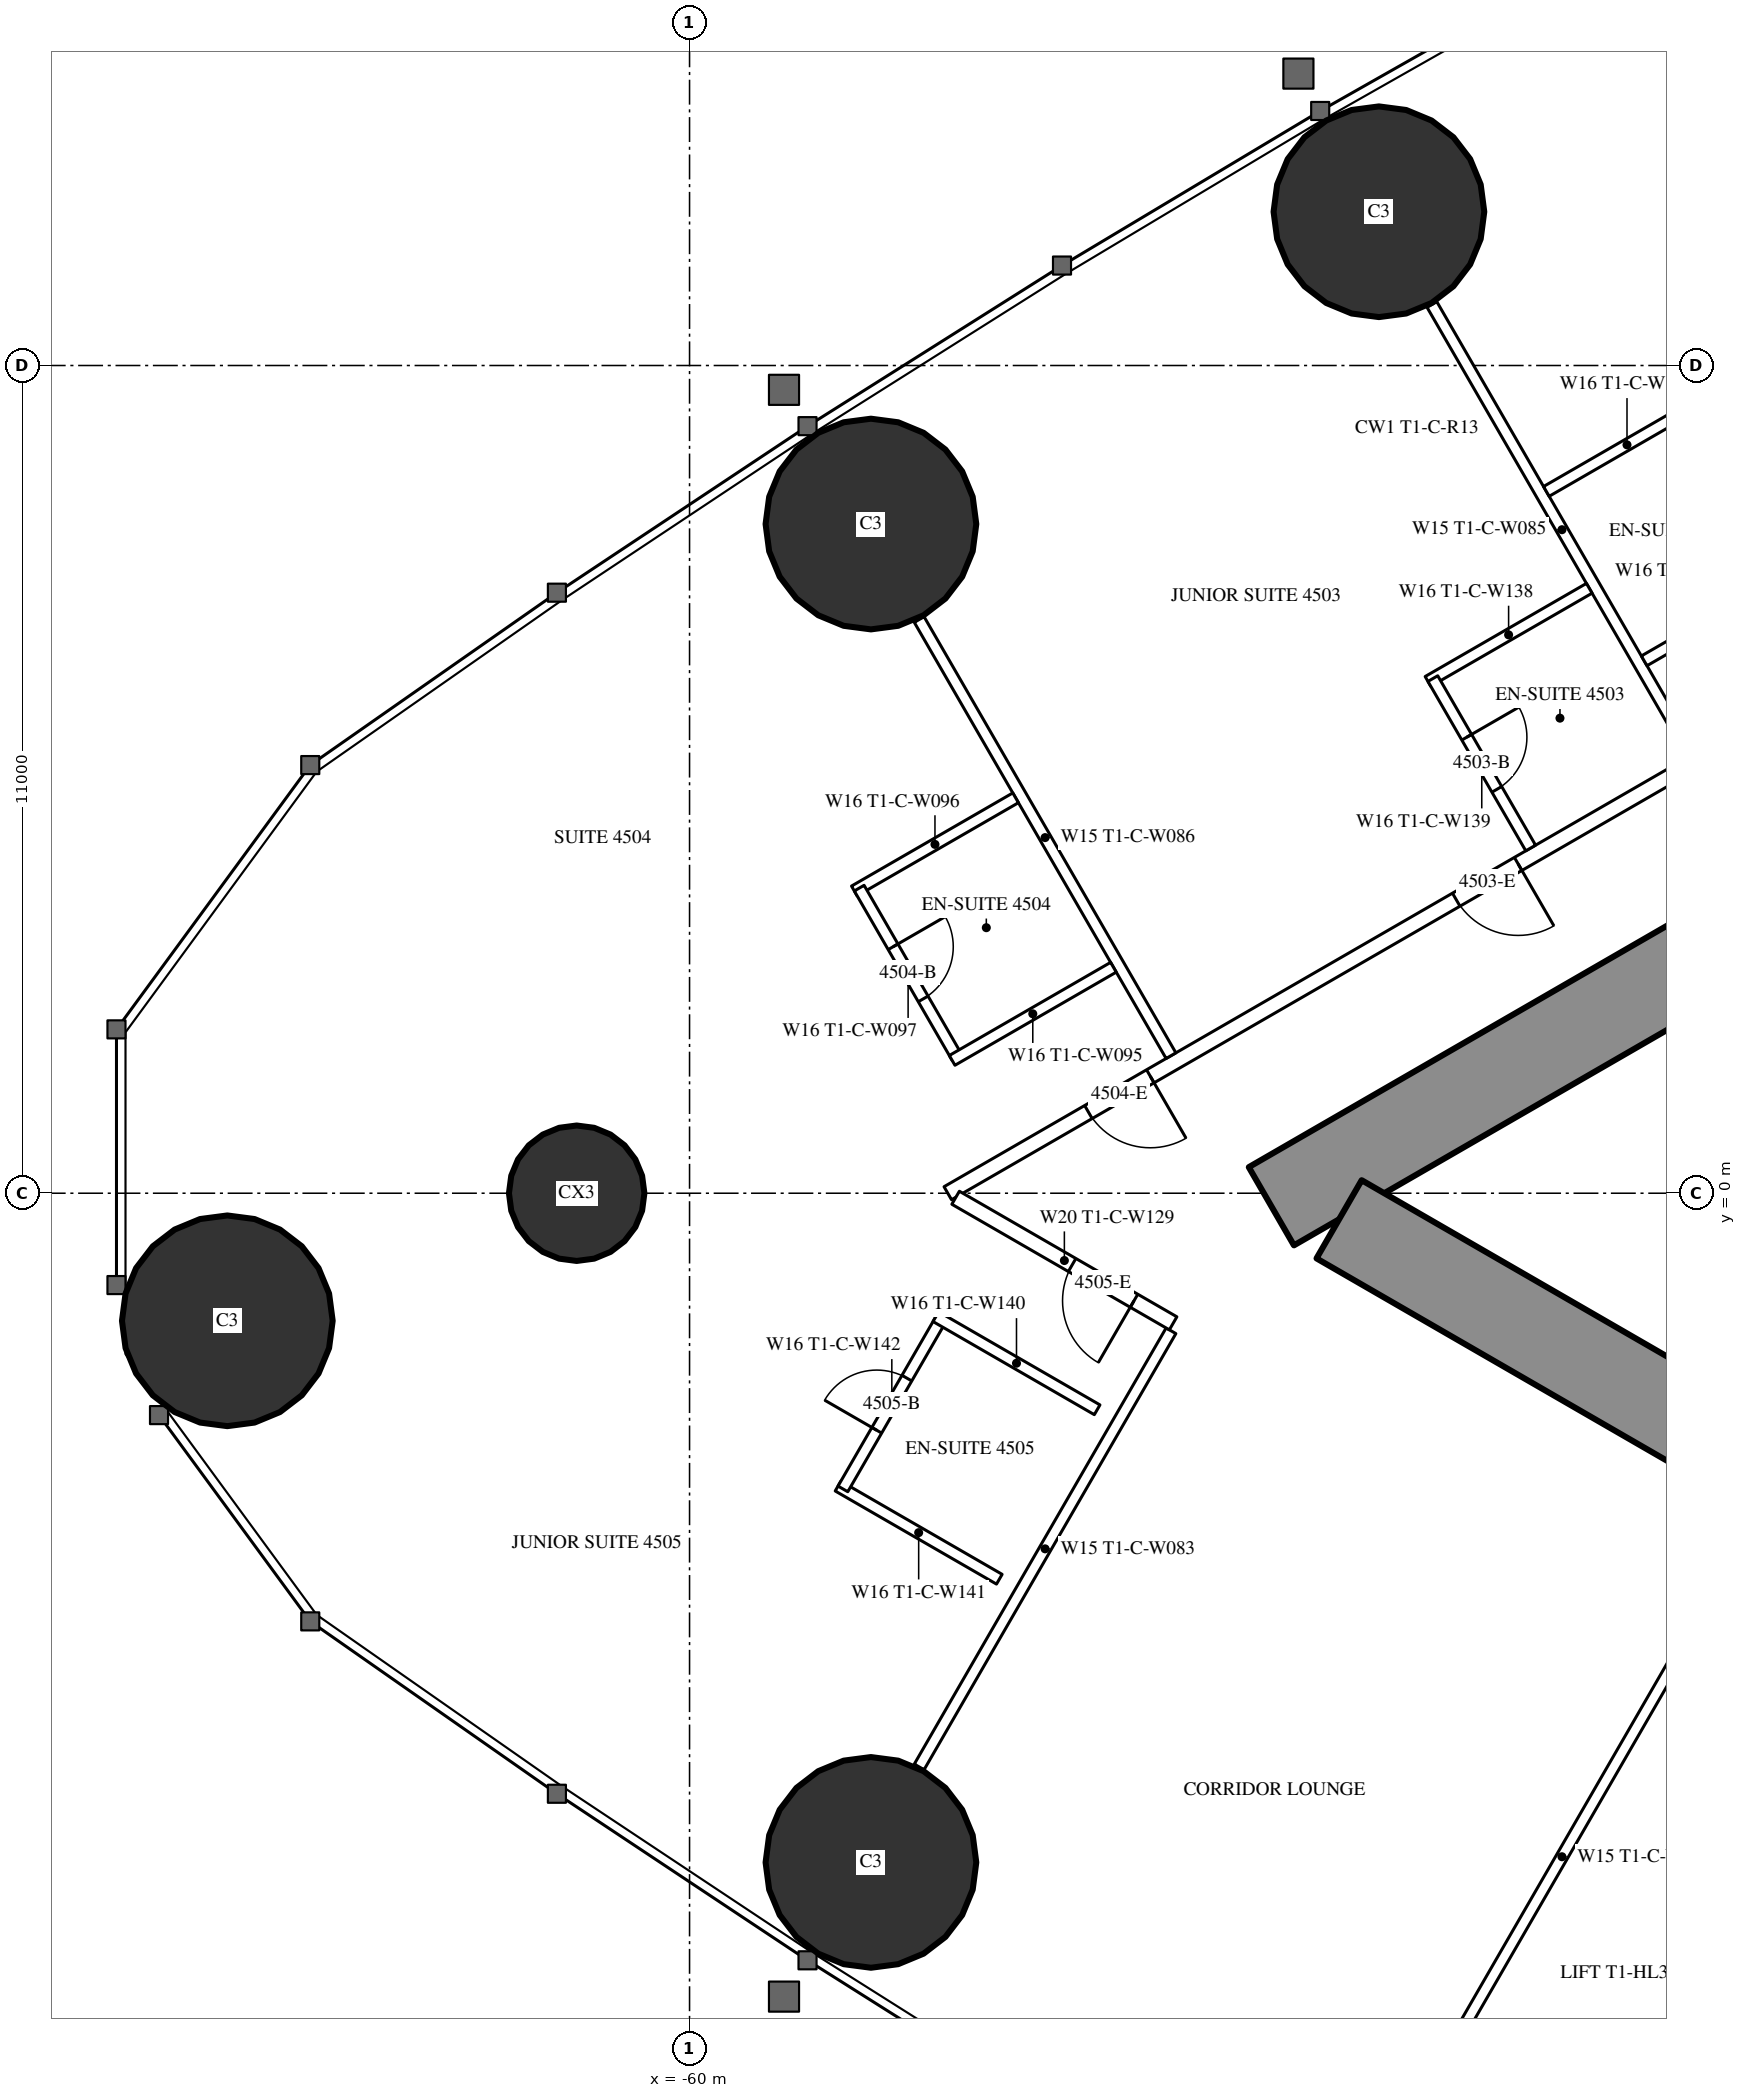
"""IFC4 building model, lengths in metres.
Left out: names, types, materials, properties, quantities, classifications, styles, units other than length and angle.
Written with IfcOpenShell. Run it as: python <this file> out.ifc"""

import sys

from ifc_helpers import new_model, si_unit, direction, frame, frame_2d, origin, origin_2d, place, context, subcontext, project, spatial, rectangle, circle, extrude, element, fill, save


model = new_model("IFC4")
c1 = context("Model", 3, precision=1e-05, world=origin(), true_north=direction((0.0, 1.0)))
c2 = subcontext(c1, "Body", "Model", "MODEL_VIEW")
j1 = project(units=[si_unit("LENGTHUNIT", "METRE"), si_unit("PLANEANGLEUNIT", "RADIAN")], contexts=[c1])
p1 = place(None, origin())
s1 = spatial("IfcSite", under=j1, at=p1, CompositionType="ELEMENT")
p2 = place(p1, origin())
s2 = spatial("IfcBuilding", under=s1, at=p2, CompositionType="ELEMENT")
p3 = place(p2, frame((0.0, 0.0, 170.3)))
s3 = spatial("IfcBuildingStorey", under=s2, at=p3, CompositionType="ELEMENT", Elevation=170.3)
for number, where, z_axis, x_axis in (
    (1, (-66.143, -1.695, 0.0), (0.0, 0.0, 1.0), (1.0, 0.0, 0.0)),
    (2, (-57.59, -8.893, 0.0), (0.0, 0.0, 1.0), (1.0, 0.0, 0.0)),
    (3, (-50.839, 13.043, 0.0), (0.0, 0.0, 1.0), (1.0, 0.0, 0.0)),
    (4, (-57.59, 8.893, 0.0), (0.0, 0.0, 1.0), (1.0, 0.0, 0.0)),
):
    element("IfcColumn", number, at=place(p3, frame(where, z_axis=z_axis, x_axis=x_axis)), inside=s3, PredefinedType="COLUMN", context=c2, shape_type="SweptSolid", body=[
        extrude(circle(Radius=1.4, at=origin_2d()), origin(), (0.0, 0.0, 1.0), 3.5),
    ])
p4 = place(p3, frame((-61.5, 0.0, 0.0), z_axis=(0.0, 0.0, 1.0), x_axis=(1.0, 0.0, 0.0)))
e5 = element("IfcColumn", 5, at=p4, inside=s3, PredefinedType="COLUMN", context=c2, shape_type="SweptSolid", body=[
    extrude(circle(Radius=0.9, at=origin_2d()), origin(), (0.0, 0.0, 1.0), 3.5),
])
p5 = place(p3, frame((-27.2, 14.3, 0.0), z_axis=(0.0, 0.0, 1.0), x_axis=(-0.866026593062, -0.499997940104, 0.0)))
e6 = element("IfcWall", 6, at=p5, inside=s3, PredefinedType="SHEAR", context=c2, shape_type="SweptSolid", body=[
    extrude(rectangle(XDim=28.946, YDim=1.2, at=frame_2d((14.473, 0.0))), origin(), (0.0, 0.0, 1.0), 3.5),
])
p6 = place(p5, frame((4.6, 0.0, 0.0)))
e7 = element("IfcOpeningElement", 7, at=p6, cuts=e6, PredefinedType="OPENING", context=c2, shape_type="SweptSolid", body=[
    extrude(rectangle(XDim=1.0, YDim=2.2, at=frame_2d((0.5, 1.1))), frame((0.0, 0.61, 0.0), z_axis=(0.0, -1.0, 0.0), x_axis=(1.0, 0.0, 0.0)), (0.0, 0.0, 1.0), 1.22),
])
p7 = place(p5, frame((13.395, 0.0, 0.0)))
e8 = element("IfcOpeningElement", 8, at=p7, cuts=e6, PredefinedType="OPENING", context=c2, shape_type="SweptSolid", body=[
    extrude(rectangle(XDim=1.8, YDim=2.2, at=frame_2d((0.9, 1.1))), frame((0.0, 0.61, 0.0), z_axis=(0.0, -1.0, 0.0), x_axis=(1.0, 0.0, 0.0)), (0.0, 0.0, 1.0), 1.22),
])
p8 = place(p3, frame((-27.2, -14.3, 0.0), z_axis=(0.0, 0.0, 1.0), x_axis=(-0.866024021859, 0.500002393557, 0.0)))
e9 = element("IfcWall", 9, at=p8, inside=s3, PredefinedType="SHEAR", context=c2, shape_type="SweptSolid", body=[
    extrude(rectangle(XDim=27.907, YDim=1.2, at=frame_2d((13.954, 0.0))), origin(), (0.0, 0.0, 1.0), 3.5),
])
p9 = place(p8, frame((4.6, 0.0, 0.0)))
e10 = element("IfcOpeningElement", 10, at=p9, cuts=e9, PredefinedType="OPENING", context=c2, shape_type="SweptSolid", body=[
    extrude(rectangle(XDim=1.0, YDim=2.2, at=frame_2d((0.5, 1.1))), frame((0.0, 0.61, 0.0), z_axis=(0.0, -1.0, 0.0), x_axis=(1.0, 0.0, 0.0)), (0.0, 0.0, 1.0), 1.22),
])
p10 = place(p8, frame((13.395, 0.0, 0.0)))
e11 = element("IfcOpeningElement", 11, at=p10, cuts=e9, PredefinedType="OPENING", context=c2, shape_type="SweptSolid", body=[
    extrude(rectangle(XDim=1.8, YDim=2.2, at=frame_2d((0.9, 1.1))), frame((0.0, 0.61, 0.0), z_axis=(0.0, -1.0, 0.0), x_axis=(1.0, 0.0, 0.0)), (0.0, 0.0, 1.0), 1.22),
])
p11 = place(p3, frame((-27.86, 16.575, 0.0), z_axis=(0.0, 0.0, 1.0), x_axis=(-0.866025533911, -0.499999774615, 0.0)))
e12 = element("IfcWall", 12, at=p11, inside=s3, PredefinedType="PARTITIONING", context=c2, shape_type="SweptSolid", body=[
    extrude(rectangle(XDim=33.149, YDim=0.2, at=frame_2d((16.575, 0.0))), origin(), (0.0, 0.0, 1.0), 3.25),
])
p12 = place(p11, frame((3.75, 0.0, 0.0)))
e13 = element("IfcOpeningElement", 13, at=p12, cuts=e12, PredefinedType="OPENING", context=c2, shape_type="SweptSolid", body=[
    extrude(rectangle(XDim=1.0, YDim=2.2, at=frame_2d((0.5, 1.1))), frame((0.0, 0.11, 0.0), z_axis=(0.0, -1.0, 0.0), x_axis=(1.0, 0.0, 0.0)), (0.0, 0.0, 1.0), 0.22),
])
p13 = place(p11, frame((20.347, 0.0, 0.0)))
e14 = element("IfcOpeningElement", 14, at=p13, cuts=e12, PredefinedType="OPENING", context=c2, shape_type="SweptSolid", body=[
    extrude(rectangle(XDim=0.95, YDim=2.2, at=frame_2d((0.475, 1.1))), frame((0.0, 0.11, 0.0), z_axis=(0.0, -1.0, 0.0), x_axis=(1.0, 0.0, 0.0)), (0.0, 0.0, 1.0), 0.22),
])
p14 = place(p11, frame((24.397, 0.0, 0.0)))
e15 = element("IfcOpeningElement", 15, at=p14, cuts=e12, PredefinedType="OPENING", context=c2, shape_type="SweptSolid", body=[
    extrude(rectangle(XDim=0.95, YDim=2.2, at=frame_2d((0.475, 1.1))), frame((0.0, 0.11, 0.0), z_axis=(0.0, -1.0, 0.0), x_axis=(1.0, 0.0, 0.0)), (0.0, 0.0, 1.0), 0.22),
])
p15 = place(p11, frame((30.042, 0.0, 0.0)))
e16 = element("IfcOpeningElement", 16, at=p15, cuts=e12, PredefinedType="OPENING", context=c2, shape_type="SweptSolid", body=[
    extrude(rectangle(XDim=0.95, YDim=2.2, at=frame_2d((0.475, 1.1))), frame((0.0, 0.11, 0.0), z_axis=(0.0, -1.0, 0.0), x_axis=(1.0, 0.0, 0.0)), (0.0, 0.0, 1.0), 0.22),
])
p16 = place(p3, frame((-46.679, 5.825, 0.0), z_axis=(0.0, 0.0, 1.0), x_axis=(-0.500006839597, 0.866021454905, 0.0)))
e17 = element("IfcWall", 17, at=p16, inside=s3, PredefinedType="PARTITIONING", context=c2, shape_type="SweptSolid", body=[
    extrude(rectangle(XDim=6.911, YDim=0.15, at=frame_2d((3.456, 0.0))), origin(), (0.0, 0.0, 1.0), 2.3),
])
p17 = place(p3, frame((-53.602, 1.828, 0.0), z_axis=(0.0, 0.0, 1.0), x_axis=(-0.49999191814, 0.866030069798, 0.0)))
e18 = element("IfcWall", 18, at=p17, inside=s3, PredefinedType="PARTITIONING", context=c2, shape_type="SweptSolid", body=[
    extrude(rectangle(XDim=6.692, YDim=0.15, at=frame_2d((3.346, 0.0))), origin(), (0.0, 0.0, 1.0), 2.3),
])
p18 = place(p3, frame((-46.679, -5.825, 0.0), z_axis=(0.0, 0.0, 1.0), x_axis=(-0.500006839597, -0.866021454905, 0.0)))
e19 = element("IfcWall", 19, at=p18, inside=s3, PredefinedType="PARTITIONING", context=c2, shape_type="SweptSolid", body=[
    extrude(rectangle(XDim=6.911, YDim=0.15, at=frame_2d((3.456, 0.0))), origin(), (0.0, 0.0, 1.0), 2.3),
])
p19 = place(p3, frame((-53.602, -1.828, 0.0), z_axis=(0.0, 0.0, 1.0), x_axis=(-0.49999191814, -0.866030069798, 0.0)))
e20 = element("IfcWall", 20, at=p19, inside=s3, PredefinedType="PARTITIONING", context=c2, shape_type="SweptSolid", body=[
    extrude(rectangle(XDim=6.692, YDim=0.15, at=frame_2d((3.346, 0.0))), origin(), (0.0, 0.0, 1.0), 2.3),
])
p20 = place(p3, frame((-53.574, -1.729, 0.0), z_axis=(0.0, 0.0, 1.0), x_axis=(-0.866019930389, 0.500009480079, 0.0)))
e21 = element("IfcWall", 21, at=p20, inside=s3, PredefinedType="PARTITIONING", context=c2, shape_type="SweptSolid", body=[
    extrude(rectangle(XDim=3.338, YDim=0.2, at=frame_2d((1.669, 0.0))), origin(), (0.0, 0.0, 1.0), 3.25),
])
p21 = place(p20, frame((0.6, 0.0, 0.0)))
e22 = element("IfcOpeningElement", 22, at=p21, cuts=e21, PredefinedType="OPENING", context=c2, shape_type="SweptSolid", body=[
    extrude(rectangle(XDim=0.95, YDim=2.2, at=frame_2d((0.475, 1.1))), frame((0.0, 0.11, 0.0), z_axis=(0.0, -1.0, 0.0), x_axis=(1.0, 0.0, 0.0)), (0.0, 0.0, 1.0), 0.22),
])
p22 = place(p3, frame((-46.47, 10.564, 0.0), z_axis=(0.0, 0.0, 1.0), x_axis=(-0.866006523861, -0.500032699561, 0.0)))
e23 = element("IfcWall", 23, at=p22, inside=s3, PredefinedType="PARTITIONING", context=c2, shape_type="SweptSolid", body=[
    extrude(rectangle(XDim=2.475, YDim=0.15, at=frame_2d((1.237, 0.0))), origin(), (0.0, 0.0, 1.0), 3.25),
])
for number, where, z_axis, x_axis in (
    (24, (-45.17, 8.312, 0.0), (0.0, 0.0, 1.0), (-0.866, -0.5, 0.0)),
    (25, (-48.044, 8.039, 0.0), (0.0, 0.0, 1.0), (-0.866, -0.5, 0.0)),
):
    element("IfcWall", number, at=place(p3, frame(where, z_axis=z_axis, x_axis=x_axis)), inside=s3, PredefinedType="PARTITIONING", context=c2, shape_type="SweptSolid", body=[
        extrude(rectangle(XDim=2.475, YDim=0.15, at=frame_2d((1.238, 0.0))), origin(), (0.0, 0.0, 1.0), 3.25),
    ])
p23 = place(p3, frame((-48.822, 4.588, 0.0), z_axis=(0.0, 0.0, 1.0), x_axis=(-0.500006934395, 0.866021400173, 0.0)))
e26 = element("IfcWall", 26, at=p23, inside=s3, PredefinedType="PARTITIONING", context=c2, shape_type="SweptSolid", body=[
    extrude(rectangle(XDim=2.6, YDim=0.15, at=frame_2d((1.3, 0.0))), origin(), (0.0, 0.0, 1.0), 3.25),
])
p24 = place(p23, frame((0.9, 0.0, 0.0)))
e27 = element("IfcOpeningElement", 27, at=p24, cuts=e26, PredefinedType="OPENING", context=c2, shape_type="SweptSolid", body=[
    extrude(rectangle(XDim=0.8, YDim=2.2, at=frame_2d((0.4, 1.1))), frame((0.0, 0.085, 0.0), z_axis=(0.0, -1.0, 0.0), x_axis=(1.0, 0.0, 0.0)), (0.0, 0.0, 1.0), 0.17),
])
p25 = place(p3, frame((-55.667, 5.255, 0.0), z_axis=(0.0, 0.0, 1.0), x_axis=(-0.866006523861, -0.500032699561, 0.0)))
e28 = element("IfcWall", 28, at=p25, inside=s3, PredefinedType="PARTITIONING", context=c2, shape_type="SweptSolid", body=[
    extrude(rectangle(XDim=2.475, YDim=0.15, at=frame_2d((1.237, 0.0))), origin(), (0.0, 0.0, 1.0), 3.25),
])
p26 = place(p3, frame((-56.446, 1.803, 0.0), z_axis=(0.0, 0.0, 1.0), x_axis=(-0.499936506574, 0.866062058628, 0.0)))
e29 = element("IfcWall", 29, at=p26, inside=s3, PredefinedType="PARTITIONING", context=c2, shape_type="SweptSolid", body=[
    extrude(rectangle(XDim=2.6, YDim=0.15, at=frame_2d((1.3, 0.0))), origin(), (0.0, 0.0, 1.0), 3.25),
])
p27 = place(p26, frame((0.9, 0.0, 0.0)))
e30 = element("IfcOpeningElement", 30, at=p27, cuts=e29, PredefinedType="OPENING", context=c2, shape_type="SweptSolid", body=[
    extrude(rectangle(XDim=0.8, YDim=2.2, at=frame_2d((0.4, 1.1))), frame((0.0, 0.085, 0.0), z_axis=(0.0, -1.0, 0.0), x_axis=(1.0, 0.0, 0.0)), (0.0, 0.0, 1.0), 0.17),
])
p28 = place(p3, frame((-54.367, 3.003, 0.0), z_axis=(0.0, 0.0, 1.0), x_axis=(-0.866031185235, -0.4999899861, 0.0)))
e31 = element("IfcWall", 31, at=p28, inside=s3, PredefinedType="PARTITIONING", context=c2, shape_type="SweptSolid", body=[
    extrude(rectangle(XDim=2.475, YDim=0.15, at=frame_2d((1.238, 0.0))), origin(), (0.0, 0.0, 1.0), 3.25),
])
p29 = place(p3, frame((-55.884, -5.13, 0.0), z_axis=(0.0, 0.0, 1.0), x_axis=(-0.866006523861, 0.500032699561, 0.0)))
e32 = element("IfcWall", 32, at=p29, inside=s3, PredefinedType="PARTITIONING", context=c2, shape_type="SweptSolid", body=[
    extrude(rectangle(XDim=2.475, YDim=0.15, at=frame_2d((1.237, 0.0))), origin(), (0.0, 0.0, 1.0), 3.25),
])
p30 = place(p3, frame((-56.662, -1.678, 0.0), z_axis=(0.0, 0.0, 1.0), x_axis=(-0.500006934395, -0.866021400173, 0.0)))
e33 = element("IfcWall", 33, at=p30, inside=s3, PredefinedType="PARTITIONING", context=c2, shape_type="SweptSolid", body=[
    extrude(rectangle(XDim=2.6, YDim=0.15, at=frame_2d((1.3, 0.0))), origin(), (0.0, 0.0, 1.0), 3.25),
])
p31 = place(p30, frame((0.9, 0.0, 0.0)))
e34 = element("IfcOpeningElement", 34, at=p31, cuts=e33, PredefinedType="OPENING", context=c2, shape_type="SweptSolid", body=[
    extrude(rectangle(XDim=0.8, YDim=2.2, at=frame_2d((0.4, 1.1))), frame((0.0, 0.085, 0.0), z_axis=(0.0, -1.0, 0.0), x_axis=(1.0, 0.0, 0.0)), (0.0, 0.0, 1.0), 0.17),
])
p32 = place(p3, frame((-54.583, -2.878, 0.0), z_axis=(0.0, 0.0, 1.0), x_axis=(-0.866006523861, 0.500032699561, 0.0)))
e35 = element("IfcWall", 35, at=p32, inside=s3, PredefinedType="PARTITIONING", context=c2, shape_type="SweptSolid", body=[
    extrude(rectangle(XDim=2.475, YDim=0.15, at=frame_2d((1.237, 0.0))), origin(), (0.0, 0.0, 1.0), 3.25),
])
p33 = place(p3, frame((-45.428, -8.568, 0.0), z_axis=(0.0, 0.0, 1.0), x_axis=(-0.499929347863, -0.866066190972, 0.0)))
e36 = element("IfcWall", 36, at=p33, inside=s3, PredefinedType="PARTITIONING", context=c2, shape_type="SweptSolid", body=[
    extrude(rectangle(XDim=3.201, YDim=0.25, at=frame_2d((1.6, 0.0))), origin(), (0.0, 0.0, 1.0), 3.25),
])
p34 = place(p24, origin())
e37 = element("IfcDoor", 37, at=p34, inside=s3, OperationType="SINGLE_SWING_RIGHT", PredefinedType="DOOR", context=c2, shape_type="SweptSolid", body=[
    extrude(rectangle(XDim=0.8, YDim=2.2, at=frame_2d((0.4, 1.1))), frame((0.0, 0.025, 0.0), z_axis=(0.0, -1.0, 0.0), x_axis=(1.0, 0.0, 0.0)), (0.0, 0.0, 1.0), 0.05),
])
fill(e27, e37)
p35 = place(p14, origin())
e38 = element("IfcDoor", 38, at=p35, inside=s3, OperationType="SINGLE_SWING_LEFT", PredefinedType="DOOR", context=c2, shape_type="SweptSolid", body=[
    extrude(rectangle(XDim=0.95, YDim=2.2, at=frame_2d((0.475, 1.1))), frame((0.0, 0.025, 0.0), z_axis=(0.0, -1.0, 0.0), x_axis=(1.0, 0.0, 0.0)), (0.0, 0.0, 1.0), 0.05),
])
fill(e15, e38)
p36 = place(p27, origin())
e39 = element("IfcDoor", 39, at=p36, inside=s3, OperationType="SINGLE_SWING_RIGHT", PredefinedType="DOOR", context=c2, shape_type="SweptSolid", body=[
    extrude(rectangle(XDim=0.8, YDim=2.2, at=frame_2d((0.4, 1.1))), frame((0.0, 0.025, 0.0), z_axis=(0.0, -1.0, 0.0), x_axis=(1.0, 0.0, 0.0)), (0.0, 0.0, 1.0), 0.05),
])
fill(e30, e39)
p37 = place(p15, origin())
e40 = element("IfcDoor", 40, at=p37, inside=s3, OperationType="SINGLE_SWING_LEFT", PredefinedType="DOOR", context=c2, shape_type="SweptSolid", body=[
    extrude(rectangle(XDim=0.95, YDim=2.2, at=frame_2d((0.475, 1.1))), frame((0.0, 0.025, 0.0), z_axis=(0.0, -1.0, 0.0), x_axis=(1.0, 0.0, 0.0)), (0.0, 0.0, 1.0), 0.05),
])
fill(e16, e40)
p38 = place(p31, origin())
e41 = element("IfcDoor", 41, at=p38, inside=s3, OperationType="SINGLE_SWING_RIGHT", PredefinedType="DOOR", context=c2, shape_type="SweptSolid", body=[
    extrude(rectangle(XDim=0.8, YDim=2.2, at=frame_2d((0.4, 1.1))), frame((0.0, 0.025, 0.0), z_axis=(0.0, -1.0, 0.0), x_axis=(1.0, 0.0, 0.0)), (0.0, 0.0, 1.0), 0.05),
])
fill(e34, e41)
p39 = place(p21, origin())
e42 = element("IfcDoor", 42, at=p39, inside=s3, OperationType="SINGLE_SWING_LEFT", PredefinedType="DOOR", context=c2, shape_type="SweptSolid", body=[
    extrude(rectangle(XDim=0.95, YDim=2.2, at=frame_2d((0.475, 1.1))), frame((0.0, 0.025, 0.0), z_axis=(0.0, -1.0, 0.0), x_axis=(1.0, 0.0, 0.0)), (0.0, 0.0, 1.0), 0.05),
])
fill(e22, e42)
save(model, sys.argv[1])
